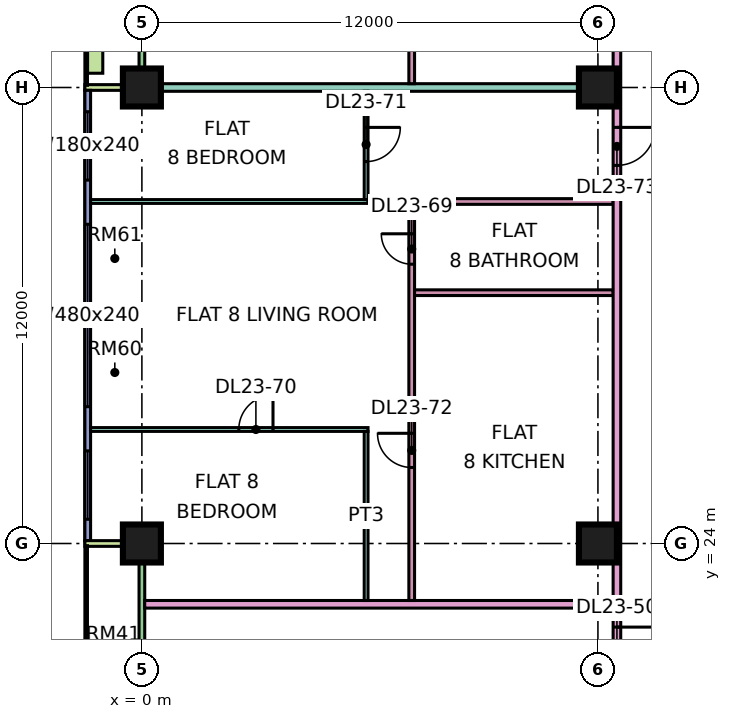
"""IFC4 building model, lengths in metres.
Left out: names, types, materials, properties, quantities, classifications, styles, units other than length and angle.
Written with IfcOpenShell. Run it as: python <this file> out.ifc"""

import sys

from ifc_helpers import new_model, si_unit, direction, frame, frame_2d, origin, origin_2d, place, context, subcontext, project, spatial, rectangle, extrude, element, fill, save


model = new_model("IFC4")
c1 = context("Model", 3, precision=1e-05, world=origin(), true_north=direction((0.0, 1.0)))
c2 = subcontext(c1, "Body", "Model", "MODEL_VIEW")
j1 = project(units=[si_unit("LENGTHUNIT", "METRE"), si_unit("PLANEANGLEUNIT", "RADIAN")], contexts=[c1])
p1 = place(None, origin())
s1 = spatial("IfcSite", under=j1, at=p1, CompositionType="ELEMENT")
p2 = place(p1, origin())
s2 = spatial("IfcBuilding", under=s1, at=p2, CompositionType="ELEMENT")
p3 = place(p2, frame((0.0, 0.0, 103.15)))
s3 = spatial("IfcBuildingStorey", under=s2, at=p3, CompositionType="ELEMENT", Elevation=103.15)
p4 = place(p3, frame((0.0, 24.0, 0.0), z_axis=(0.0, 0.0, 1.0), x_axis=(1.0, 0.0, 0.0)))
e1 = element("IfcColumn", 1, at=p4, inside=s3, PredefinedType="COLUMN", context=c2, shape_type="SweptSolid", body=[
    extrude(rectangle(XDim=1.0, YDim=1.0, at=origin_2d()), origin(), (0.0, 0.0, 1.0), 3.75),
])
p5 = place(p3, frame((0.0, 36.0, 0.0), z_axis=(0.0, 0.0, 1.0), x_axis=(1.0, 0.0, 0.0)))
e2 = element("IfcColumn", 2, at=p5, inside=s3, PredefinedType="COLUMN", context=c2, shape_type="SweptSolid", body=[
    extrude(rectangle(XDim=1.0, YDim=1.0, at=origin_2d()), origin(), (0.0, 0.0, 1.0), 3.75),
])
for number, where, z_axis, x_axis in (
    (3, (12.0, 24.0, 0.0), (0.0, 0.0, 1.0), (1.0, 0.0, 0.0)),
    (4, (12.0, 36.0, 0.0), (0.0, 0.0, 1.0), (1.0, 0.0, 0.0)),
):
    element("IfcColumn", number, at=place(p3, frame(where, z_axis=z_axis, x_axis=x_axis)), inside=s3, PredefinedType="COLUMN", context=c2, shape_type="SweptSolid", body=[
        extrude(rectangle(XDim=1.0, YDim=1.0, at=origin_2d()), origin(), (0.0, 0.0, 1.0), 3.75),
    ])
p6 = place(p3, frame((0.0, 47.925, 0.0), z_axis=(0.0, 0.0, 1.0), x_axis=(0.0, -1.0, 0.0)))
e5 = element("IfcWall", 5, at=p6, inside=s3, PredefinedType="SOLIDWALL", context=c2, shape_type="SweptSolid", body=[
    extrude(rectangle(XDim=11.85, YDim=0.15, at=frame_2d((5.925, 0.0))), origin(), (0.0, 0.0, 1.0), 3.35),
])
p7 = place(p6, frame((0.562, 0.0, 0.45)))
e6 = element("IfcOpeningElement", 6, at=p7, cuts=e5, PredefinedType="OPENING", context=c2, shape_type="SweptSolid", body=[
    extrude(rectangle(XDim=1.2, YDim=2.4, at=frame_2d((0.6, 1.2))), frame((0.0, 0.085, 0.0), z_axis=(0.0, -1.0, 0.0), x_axis=(1.0, 0.0, 0.0)), (0.0, 0.0, 1.0), 0.17),
])
p8 = place(p6, frame((4.125, 0.0, 0.0)))
e7 = element("IfcOpeningElement", 7, at=p8, cuts=e5, PredefinedType="OPENING", context=c2, shape_type="SweptSolid", body=[
    extrude(rectangle(XDim=1.2, YDim=2.4, at=frame_2d((0.6, 1.2))), frame((0.0, 0.085, 0.0), z_axis=(0.0, -1.0, 0.0), x_axis=(1.0, 0.0, 0.0)), (0.0, 0.0, 1.0), 0.17),
])
p9 = place(p6, frame((6.525, 0.0, 0.45)))
e8 = element("IfcOpeningElement", 8, at=p9, cuts=e5, PredefinedType="OPENING", context=c2, shape_type="SweptSolid", body=[
    extrude(rectangle(XDim=1.8, YDim=2.4, at=frame_2d((0.9, 1.2))), frame((0.0, 0.085, 0.0), z_axis=(0.0, -1.0, 0.0), x_axis=(1.0, 0.0, 0.0)), (0.0, 0.0, 1.0), 0.17),
])
p10 = place(p6, frame((9.525, 0.0, 0.45)))
e9 = element("IfcOpeningElement", 9, at=p10, cuts=e5, PredefinedType="OPENING", context=c2, shape_type="SweptSolid", body=[
    extrude(rectangle(XDim=1.2, YDim=2.4, at=frame_2d((0.6, 1.2))), frame((0.0, 0.085, 0.0), z_axis=(0.0, -1.0, 0.0), x_axis=(1.0, 0.0, 0.0)), (0.0, 0.0, 1.0), 0.17),
])
p11 = place(p3, frame((-1.5, 36.0, 0.0), z_axis=(0.0, 0.0, 1.0), x_axis=(1.0, 0.0, 0.0)))
e10 = element("IfcWall", 10, at=p11, inside=s3, PredefinedType="SOLIDWALL", context=c2, shape_type="SweptSolid", body=[
    extrude(rectangle(XDim=1.5, YDim=0.15, at=frame_2d((0.75, 0.0))), origin(), (0.0, 0.0, 1.0), 3.35),
])
p12 = place(p3, frame((-1.425, 35.925, 0.0), z_axis=(0.0, 0.0, 1.0), x_axis=(0.0, -1.0, 0.0)))
e11 = element("IfcWall", 11, at=p12, inside=s3, PredefinedType="SOLIDWALL", context=c2, shape_type="SweptSolid", body=[
    extrude(rectangle(XDim=11.85, YDim=0.15, at=frame_2d((5.925, 0.0))), origin(), (0.0, 0.0, 1.0), 3.35),
])
p13 = place(p12, frame((0.562, 0.0, 0.45)))
e12 = element("IfcOpeningElement", 12, at=p13, cuts=e11, PredefinedType="OPENING", context=c2, shape_type="SweptSolid", body=[
    extrude(rectangle(XDim=1.8, YDim=2.4, at=frame_2d((0.9, 1.2))), frame((0.0, 0.085, 0.0), z_axis=(0.0, -1.0, 0.0), x_axis=(1.0, 0.0, 0.0)), (0.0, 0.0, 1.0), 0.17),
])
p14 = place(p12, frame((3.525, 0.0, 0.45)))
e13 = element("IfcOpeningElement", 13, at=p14, cuts=e11, PredefinedType="OPENING", context=c2, shape_type="SweptSolid", body=[
    extrude(rectangle(XDim=4.8, YDim=2.4, at=frame_2d((2.4, 1.2))), frame((0.0, 0.085, 0.0), z_axis=(0.0, -1.0, 0.0), x_axis=(1.0, 0.0, 0.0)), (0.0, 0.0, 1.0), 0.17),
])
p15 = place(p12, frame((9.488, 0.0, 0.45)))
e14 = element("IfcOpeningElement", 14, at=p15, cuts=e11, PredefinedType="OPENING", context=c2, shape_type="SweptSolid", body=[
    extrude(rectangle(XDim=1.8, YDim=2.4, at=frame_2d((0.9, 1.2))), frame((0.0, 0.085, 0.0), z_axis=(0.0, -1.0, 0.0), x_axis=(1.0, 0.0, 0.0)), (0.0, 0.0, 1.0), 0.17),
])
p16 = place(p3, frame((0.0, 23.925, 0.0), z_axis=(0.0, 0.0, 1.0), x_axis=(0.0, -1.0, 0.0)))
e15 = element("IfcWall", 15, at=p16, inside=s3, PredefinedType="SOLIDWALL", context=c2, shape_type="SweptSolid", body=[
    extrude(rectangle(XDim=11.35, YDim=0.15, at=frame_2d((5.675, 0.0))), origin(), (0.0, 0.0, 1.0), 3.35),
])
p17 = place(p16, frame((6.738, 0.0, 0.0)))
e16 = element("IfcOpeningElement", 16, at=p17, cuts=e15, PredefinedType="OPENING", context=c2, shape_type="SweptSolid", body=[
    extrude(rectangle(XDim=1.8, YDim=2.4, at=frame_2d((0.9, 1.2))), frame((0.0, 0.085, 0.0), z_axis=(0.0, -1.0, 0.0), x_axis=(1.0, 0.0, 0.0)), (0.0, 0.0, 1.0), 0.17),
])
p18 = place(p3, frame((-1.5, 24.0, 0.0), z_axis=(0.0, 0.0, 1.0), x_axis=(1.0, 0.0, 0.0)))
e17 = element("IfcWall", 17, at=p18, inside=s3, PredefinedType="SOLIDWALL", context=c2, shape_type="SweptSolid", body=[
    extrude(rectangle(XDim=1.5, YDim=0.15, at=frame_2d((0.75, 0.0))), origin(), (0.0, 0.0, 1.0), 3.35),
])
p19 = place(p3, frame((-1.229, 47.625, 0.0), z_axis=(0.0, 0.0, 1.0), x_axis=(0.0, -1.0, 0.0)))
e18 = element("IfcWall", 18, at=p19, inside=s3, PredefinedType="SOLIDWALL", context=c2, shape_type="SweptSolid", body=[
    extrude(rectangle(XDim=11.25, YDim=0.4, at=frame_2d((5.625, 0.0))), origin(), (0.0, 0.0, 1.0), 0.7),
])
p20 = place(p3, frame((-1.35, 27.0, 0.0), z_axis=(0.0, 0.0, 1.0), x_axis=(1.0, 0.0, 0.0)))
e19 = element("IfcWall", 19, at=p20, inside=s3, PredefinedType="PARTITIONING", context=c2, shape_type="SweptSolid", body=[
    extrude(rectangle(XDim=7.3, YDim=0.1, at=frame_2d((3.65, 0.0))), origin(), (0.0, 0.0, 1.0), 3.35),
])
p21 = place(p20, frame((3.9, 0.0, 0.0)))
e20 = element("IfcOpeningElement", 20, at=p21, cuts=e19, PredefinedType="OPENING", context=c2, shape_type="SweptSolid", body=[
    extrude(rectangle(XDim=0.9, YDim=2.1, at=frame_2d((0.45, 1.05))), frame((0.0, 0.06, 0.0), z_axis=(0.0, -1.0, 0.0), x_axis=(1.0, 0.0, 0.0)), (0.0, 0.0, 1.0), 0.12),
])
p22 = place(p3, frame((-1.35, 33.0, 0.0), z_axis=(0.0, 0.0, 1.0), x_axis=(1.0, 0.0, 0.0)))
e21 = element("IfcWall", 21, at=p22, inside=s3, PredefinedType="PARTITIONING", context=c2, shape_type="SweptSolid", body=[
    extrude(rectangle(XDim=7.3, YDim=0.1, at=frame_2d((3.65, 0.0))), origin(), (0.0, 0.0, 1.0), 3.35),
])
e22 = element("IfcWall", 22, at=p5, inside=s3, PredefinedType="PARTITIONING", context=c2, shape_type="SweptSolid", body=[
    extrude(rectangle(XDim=12.4, YDim=0.2, at=frame_2d((6.2, 0.0))), origin(), (0.0, 0.0, 1.0), 3.35),
])
p23 = place(p3, frame((0.074, 22.4, 0.0), z_axis=(0.0, 0.0, 1.0), x_axis=(1.0, 0.0, 0.0)))
e23 = element("IfcWall", 23, at=p23, inside=s3, PredefinedType="PARTITIONING", context=c2, shape_type="SweptSolid", body=[
    extrude(rectangle(XDim=12.326, YDim=0.2, at=frame_2d((6.163, 0.0))), origin(), (0.0, 0.0, 1.0), 3.35),
])
p24 = place(p3, frame((5.9, 22.5, 0.0), z_axis=(0.0, 0.0, 1.0), x_axis=(0.0, 1.0, 0.0)))
e24 = element("IfcWall", 24, at=p24, inside=s3, PredefinedType="PARTITIONING", context=c2, shape_type="SweptSolid", body=[
    extrude(rectangle(XDim=4.45, YDim=0.1, at=frame_2d((2.225, 0.0))), origin(), (0.0, 0.0, 1.0), 3.35),
])
p25 = place(p3, frame((5.9, 33.05, 0.0), z_axis=(0.0, 0.0, 1.0), x_axis=(0.0, 1.0, 0.0)))
e25 = element("IfcWall", 25, at=p25, inside=s3, PredefinedType="PARTITIONING", context=c2, shape_type="SweptSolid", body=[
    extrude(rectangle(XDim=2.85, YDim=0.1, at=frame_2d((1.425, 0.0))), origin(), (0.0, 0.0, 1.0), 3.35),
])
p26 = place(p25, frame((1.0, 0.0, 0.0)))
e26 = element("IfcOpeningElement", 26, at=p26, cuts=e25, PredefinedType="OPENING", context=c2, shape_type="SweptSolid", body=[
    extrude(rectangle(XDim=0.9, YDim=2.1, at=frame_2d((0.45, 1.05))), frame((0.0, 0.06, 0.0), z_axis=(0.0, -1.0, 0.0), x_axis=(1.0, 0.0, 0.0)), (0.0, 0.0, 1.0), 0.12),
])
p27 = place(p3, frame((7.1, 22.5, 0.0), z_axis=(0.0, 0.0, 1.0), x_axis=(0.0, 1.0, 0.0)))
e27 = element("IfcWall", 27, at=p27, inside=s3, PredefinedType="PARTITIONING", context=c2, shape_type="SweptSolid", body=[
    extrude(rectangle(XDim=10.575, YDim=0.15, at=frame_2d((5.288, 0.0))), origin(), (0.0, 0.0, 1.0), 3.35),
])
p28 = place(p27, frame((8.85, 0.0, 0.0)))
e28 = element("IfcOpeningElement", 28, at=p28, cuts=e27, PredefinedType="OPENING", context=c2, shape_type="SweptSolid", body=[
    extrude(rectangle(XDim=0.8, YDim=2.1, at=frame_2d((0.4, 1.05))), frame((0.0, 0.085, 0.0), z_axis=(0.0, -1.0, 0.0), x_axis=(1.0, 0.0, 0.0)), (0.0, 0.0, 1.0), 0.17),
])
p29 = place(p27, frame((3.5, 0.0, 0.0)))
e29 = element("IfcOpeningElement", 29, at=p29, cuts=e27, PredefinedType="OPENING", context=c2, shape_type="SweptSolid", body=[
    extrude(rectangle(XDim=0.9, YDim=2.1, at=frame_2d((0.45, 1.05))), frame((0.0, 0.085, 0.0), z_axis=(0.0, -1.0, 0.0), x_axis=(1.0, 0.0, 0.0)), (0.0, 0.0, 1.0), 0.17),
])
p30 = place(p3, frame((7.1, 36.1, 0.0), z_axis=(0.0, 0.0, 1.0), x_axis=(0.0, 1.0, 0.0)))
e30 = element("IfcWall", 30, at=p30, inside=s3, PredefinedType="PARTITIONING", context=c2, shape_type="SweptSolid", body=[
    extrude(rectangle(XDim=11.375, YDim=0.15, at=frame_2d((5.688, 0.0))), origin(), (0.0, 0.0, 1.0), 3.35),
])
p31 = place(p30, frame((7.4, 0.0, 0.0)))
e31 = element("IfcOpeningElement", 31, at=p31, cuts=e30, PredefinedType="OPENING", context=c2, shape_type="SweptSolid", body=[
    extrude(rectangle(XDim=0.8, YDim=2.1, at=frame_2d((0.4, 1.05))), frame((0.0, 0.085, 0.0), z_axis=(0.0, -1.0, 0.0), x_axis=(1.0, 0.0, 0.0)), (0.0, 0.0, 1.0), 0.17),
])
p32 = place(p30, frame((2.75, 0.0, 0.0)))
e32 = element("IfcOpeningElement", 32, at=p32, cuts=e30, PredefinedType="OPENING", context=c2, shape_type="SweptSolid", body=[
    extrude(rectangle(XDim=0.9, YDim=2.1, at=frame_2d((0.45, 1.05))), frame((0.0, 0.085, 0.0), z_axis=(0.0, -1.0, 0.0), x_axis=(1.0, 0.0, 0.0)), (0.0, 0.0, 1.0), 0.17),
])
p33 = place(p30, frame((9.8, 0.0, 0.0)))
e33 = element("IfcOpeningElement", 33, at=p33, cuts=e30, PredefinedType="OPENING", context=c2, shape_type="SweptSolid", body=[
    extrude(rectangle(XDim=0.8, YDim=2.1, at=frame_2d((0.4, 1.05))), frame((0.0, 0.085, 0.0), z_axis=(0.0, -1.0, 0.0), x_axis=(1.0, 0.0, 0.0)), (0.0, 0.0, 1.0), 0.17),
])
for number, where, z_axis, x_axis in (
    (34, (7.175, 30.6, 0.0), (0.0, 0.0, 1.0), (1.0, 0.0, 0.0)),
    (35, (7.175, 33.0, 0.0), (0.0, 0.0, 1.0), (1.0, 0.0, 0.0)),
):
    element("IfcWall", number, at=place(p3, frame(where, z_axis=z_axis, x_axis=x_axis)), inside=s3, PredefinedType="PARTITIONING", context=c2, shape_type="SweptSolid", body=[
        extrude(rectangle(XDim=5.225, YDim=0.15, at=frame_2d((2.612, 0.0))), origin(), (0.0, 0.0, 1.0), 3.35),
    ])
p34 = place(p3, frame((12.5, 20.0, 0.0), z_axis=(0.0, 0.0, 1.0), x_axis=(0.0, 1.0, 0.0)))
e36 = element("IfcWall", 36, at=p34, inside=s3, PredefinedType="PARTITIONING", context=c2, shape_type="SweptSolid", body=[
    extrude(rectangle(XDim=42.926, YDim=0.2, at=frame_2d((21.463, 0.0))), origin(), (0.0, 0.0, 1.0), 3.35),
])
p35 = place(p34, frame((28.65, 0.0, 0.0)))
e37 = element("IfcOpeningElement", 37, at=p35, cuts=e36, PredefinedType="OPENING", context=c2, shape_type="SweptSolid", body=[
    extrude(rectangle(XDim=1.0, YDim=2.1, at=frame_2d((0.5, 1.05))), frame((0.0, 0.11, 0.0), z_axis=(0.0, -1.0, 0.0), x_axis=(1.0, 0.0, 0.0)), (0.0, 0.0, 1.0), 0.22),
])
p36 = place(p34, frame((32.1, 0.0, 0.0)))
e38 = element("IfcOpeningElement", 38, at=p36, cuts=e36, PredefinedType="OPENING", context=c2, shape_type="SweptSolid", body=[
    extrude(rectangle(XDim=1.0, YDim=2.1, at=frame_2d((0.5, 1.05))), frame((0.0, 0.11, 0.0), z_axis=(0.0, -1.0, 0.0), x_axis=(1.0, 0.0, 0.0)), (0.0, 0.0, 1.0), 0.22),
])
p37 = place(p34, frame((0.6, 0.0, 0.0)))
e39 = element("IfcOpeningElement", 39, at=p37, cuts=e36, PredefinedType="OPENING", context=c2, shape_type="SweptSolid", body=[
    extrude(rectangle(XDim=1.2, YDim=2.1, at=frame_2d((0.6, 1.05))), frame((0.0, 0.11, 0.0), z_axis=(0.0, -1.0, 0.0), x_axis=(1.0, 0.0, 0.0)), (0.0, 0.0, 1.0), 0.22),
])
p38 = place(p34, frame((13.95, 0.0, 0.0)))
e40 = element("IfcOpeningElement", 40, at=p38, cuts=e36, PredefinedType="OPENING", context=c2, shape_type="SweptSolid", body=[
    extrude(rectangle(XDim=1.0, YDim=2.1, at=frame_2d((0.5, 1.05))), frame((0.0, 0.11, 0.0), z_axis=(0.0, -1.0, 0.0), x_axis=(1.0, 0.0, 0.0)), (0.0, 0.0, 1.0), 0.22),
])
p39 = place(p13, origin())
e41 = element("IfcWindow", 41, at=p39, inside=s3, PartitioningType="SINGLE_PANEL", PredefinedType="WINDOW", context=c2, shape_type="SweptSolid", body=[
    extrude(rectangle(XDim=1.8, YDim=2.4, at=frame_2d((0.9, 1.2))), frame((0.0, 0.03, 0.0), z_axis=(0.0, -1.0, 0.0), x_axis=(1.0, 0.0, 0.0)), (0.0, 0.0, 1.0), 0.06),
])
fill(e12, e41)
p40 = place(p14, origin())
e42 = element("IfcWindow", 42, at=p40, inside=s3, PartitioningType="SINGLE_PANEL", PredefinedType="WINDOW", context=c2, shape_type="SweptSolid", body=[
    extrude(rectangle(XDim=4.8, YDim=2.4, at=frame_2d((2.4, 1.2))), frame((0.0, 0.03, 0.0), z_axis=(0.0, -1.0, 0.0), x_axis=(1.0, 0.0, 0.0)), (0.0, 0.0, 1.0), 0.06),
])
fill(e13, e42)
p41 = place(p15, origin())
e43 = element("IfcWindow", 43, at=p41, inside=s3, PartitioningType="SINGLE_PANEL", PredefinedType="WINDOW", context=c2, shape_type="SweptSolid", body=[
    extrude(rectangle(XDim=1.8, YDim=2.4, at=frame_2d((0.9, 1.2))), frame((0.0, 0.03, 0.0), z_axis=(0.0, -1.0, 0.0), x_axis=(1.0, 0.0, 0.0)), (0.0, 0.0, 1.0), 0.06),
])
fill(e14, e43)
p42 = place(p37, origin())
e44 = element("IfcDoor", 44, at=p42, inside=s3, OperationType="SINGLE_SWING_RIGHT", PredefinedType="DOOR", context=c2, shape_type="SweptSolid", body=[
    extrude(rectangle(XDim=1.2, YDim=2.1, at=frame_2d((0.6, 1.05))), frame((0.0, 0.025, 0.0), z_axis=(0.0, -1.0, 0.0), x_axis=(1.0, 0.0, 0.0)), (0.0, 0.0, 1.0), 0.05),
])
fill(e39, e44)
p43 = place(p28, frame((0.8, 0.0, 0.0), z_axis=(0.0, 0.0, 1.0), x_axis=(-1.0, 0.0, 0.0)))
e45 = element("IfcDoor", 45, at=p43, inside=s3, OperationType="SINGLE_SWING_RIGHT", PredefinedType="DOOR", context=c2, shape_type="SweptSolid", body=[
    extrude(rectangle(XDim=0.8, YDim=2.1, at=frame_2d((0.4, 1.05))), frame((0.0, 0.025, 0.0), z_axis=(0.0, -1.0, 0.0), x_axis=(1.0, 0.0, 0.0)), (0.0, 0.0, 1.0), 0.05),
])
fill(e28, e45)
p44 = place(p21, frame((0.9, 0.0, 0.0), z_axis=(0.0, 0.0, 1.0), x_axis=(-1.0, 0.0, 0.0)))
e46 = element("IfcDoor", 46, at=p44, inside=s3, OperationType="SINGLE_SWING_RIGHT", PredefinedType="DOOR", context=c2, shape_type="SweptSolid", body=[
    extrude(rectangle(XDim=0.9, YDim=2.1, at=frame_2d((0.45, 1.05))), frame((0.0, 0.025, 0.0), z_axis=(0.0, -1.0, 0.0), x_axis=(1.0, 0.0, 0.0)), (0.0, 0.0, 1.0), 0.05),
])
fill(e20, e46)
p45 = place(p26, origin())
e47 = element("IfcDoor", 47, at=p45, inside=s3, OperationType="SINGLE_SWING_RIGHT", PredefinedType="DOOR", context=c2, shape_type="SweptSolid", body=[
    extrude(rectangle(XDim=0.9, YDim=2.1, at=frame_2d((0.45, 1.05))), frame((0.0, 0.025, 0.0), z_axis=(0.0, -1.0, 0.0), x_axis=(1.0, 0.0, 0.0)), (0.0, 0.0, 1.0), 0.05),
])
fill(e26, e47)
p46 = place(p29, frame((0.9, 0.0, 0.0), z_axis=(0.0, 0.0, 1.0), x_axis=(-1.0, 0.0, 0.0)))
e48 = element("IfcDoor", 48, at=p46, inside=s3, OperationType="SINGLE_SWING_RIGHT", PredefinedType="DOOR", context=c2, shape_type="SweptSolid", body=[
    extrude(rectangle(XDim=0.9, YDim=2.1, at=frame_2d((0.45, 1.05))), frame((0.0, 0.025, 0.0), z_axis=(0.0, -1.0, 0.0), x_axis=(1.0, 0.0, 0.0)), (0.0, 0.0, 1.0), 0.05),
])
fill(e29, e48)
p47 = place(p38, origin())
e49 = element("IfcDoor", 49, at=p47, inside=s3, OperationType="SINGLE_SWING_RIGHT", PredefinedType="DOOR", context=c2, shape_type="SweptSolid", body=[
    extrude(rectangle(XDim=1.0, YDim=2.1, at=frame_2d((0.5, 1.05))), frame((0.0, 0.025, 0.0), z_axis=(0.0, -1.0, 0.0), x_axis=(1.0, 0.0, 0.0)), (0.0, 0.0, 1.0), 0.05),
])
fill(e40, e49)
save(model, sys.argv[1])
